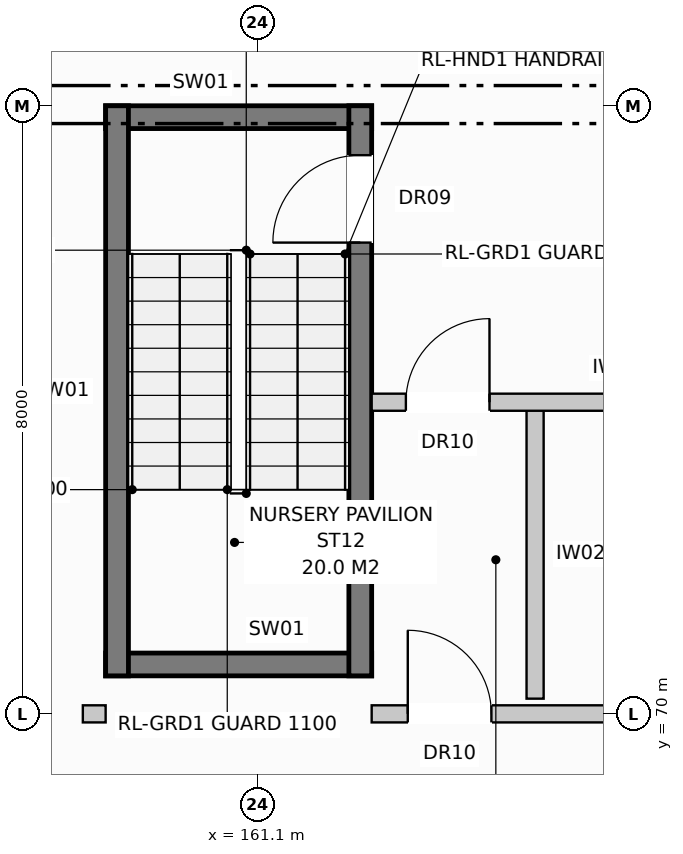
"""IFC4 building model, lengths in metres.
Left out: names, types, materials, properties, quantities, classifications, styles, units other than length and angle.
Written with IfcOpenShell. Run it as: python <this file> out.ifc"""

import sys

from ifc_helpers import new_model, si_unit, direction, frame, frame_2d, origin, origin_with_axes, place, context, subcontext, project, spatial, rectangle, extrude, element, fill, save


model = new_model("IFC4")
c1 = context("Model", 3, precision=1e-05, world=origin(), true_north=direction((0.0, 1.0)))
c2 = subcontext(c1, "Body", "Model", "MODEL_VIEW")
j1 = project(units=[si_unit("LENGTHUNIT", "METRE"), si_unit("PLANEANGLEUNIT", "RADIAN")], contexts=[c1])
p1 = place(None, origin())
s1 = spatial("IfcSite", under=j1, at=p1, CompositionType="ELEMENT")
p2 = place(p1, origin())
s2 = spatial("IfcBuilding", under=s1, at=p2, CompositionType="ELEMENT")
p3 = place(p2, frame((0.0, 0.0, -3.8)))
s3 = spatial("IfcBuildingStorey", under=s2, at=p3, CompositionType="ELEMENT", Elevation=-3.8)
for number, where, z_axis, x_axis in (
    (1, (159.1, 77.85, 0.0), (0.0, 0.0, 1.0), (1.0, 0.0, 0.0)),
    (2, (159.1, 70.65, 0.0), (0.0, 0.0, 1.0), (1.0, 0.0, 0.0)),
):
    element("IfcWall", number, at=place(p3, frame(where, z_axis=z_axis, x_axis=x_axis)), inside=s3, PredefinedType="SHEAR", context=c2, shape_type="SweptSolid", body=[
        extrude(rectangle(XDim=3.5, YDim=0.3, at=frame_2d((1.75, 0.0))), origin(), (0.0, 0.0, 1.0), 3.48),
    ])
p4 = place(p3, frame((159.25, 70.5, 0.0), z_axis=(0.0, 0.0, 1.0), x_axis=(0.0, 1.0, 0.0)))
e3 = element("IfcWall", 3, at=p4, inside=s3, PredefinedType="SHEAR", context=c2, shape_type="SweptSolid", body=[
    extrude(rectangle(XDim=7.5, YDim=0.3, at=frame_2d((3.75, 0.0))), origin(), (0.0, 0.0, 1.0), 3.48),
])
p5 = place(p3, frame((162.45, 70.5, 0.0), z_axis=(0.0, 0.0, 1.0), x_axis=(0.0, 1.0, 0.0)))
e4 = element("IfcWall", 4, at=p5, inside=s3, PredefinedType="SHEAR", context=c2, shape_type="SweptSolid", body=[
    extrude(rectangle(XDim=7.5, YDim=0.3, at=frame_2d((3.75, 0.0))), origin(), (0.0, 0.0, 1.0), 3.48),
])
p6 = place(p5, frame((5.7, 0.0, 0.0)))
e5 = element("IfcOpeningElement", 5, at=p6, cuts=e4, PredefinedType="OPENING", context=c2, shape_type="SweptSolid", body=[
    extrude(rectangle(XDim=1.15, YDim=2.15, at=frame_2d((0.575, 1.075))), frame((0.0, 0.162, 0.0), z_axis=(0.0, -1.0, 0.0), x_axis=(1.0, 0.0, 0.0)), (0.0, 0.0, 1.0), 0.324),
])
p7 = place(p3, frame((164.75, 70.2, 0.0), z_axis=(0.0, 0.0, 1.0), x_axis=(0.0, 1.0, 0.0)))
e6 = element("IfcWall", 6, at=p7, inside=s3, PredefinedType="PARTITIONING", context=c2, shape_type="SweptSolid", body=[
    extrude(rectangle(XDim=3.8, YDim=0.225, at=frame_2d((1.9, 0.0))), origin(), (0.0, 0.0, 1.0), 3.48),
])
p8 = place(p3, frame((162.6, 74.1, 0.0), z_axis=(0.0, 0.0, 1.0), x_axis=(1.0, 0.0, 0.0)))
e7 = element("IfcWall", 7, at=p8, inside=s3, PredefinedType="PARTITIONING", context=c2, shape_type="SweptSolid", body=[
    extrude(rectangle(XDim=4.91, YDim=0.225, at=frame_2d((2.455, 0.0))), origin(), (0.0, 0.0, 1.0), 3.48),
])
p9 = place(p8, frame((0.45, 0.0, 0.0)))
e8 = element("IfcOpeningElement", 8, at=p9, cuts=e7, PredefinedType="OPENING", context=c2, shape_type="SweptSolid", body=[
    extrude(rectangle(XDim=1.1, YDim=2.15, at=frame_2d((0.55, 1.075))), frame((0.0, 0.125, 0.0), z_axis=(0.0, -1.0, 0.0), x_axis=(1.0, 0.0, 0.0)), (0.0, 0.0, 1.0), 0.249),
])
p10 = place(p3, frame((158.8, 70.0, 0.0), z_axis=(0.0, 0.0, 1.0), x_axis=(1.0, 0.0, 0.0)))
e9 = element("IfcWall", 9, at=p10, inside=s3, PredefinedType="PARTITIONING", context=c2, shape_type="SweptSolid", body=[
    extrude(rectangle(XDim=0.3, YDim=0.225, at=frame_2d((0.15, 0.0))), origin(), (0.0, 0.0, 1.0), 3.48),
])
p11 = place(p3, frame((162.6, 70.0, 0.0), z_axis=(0.0, 0.0, 1.0), x_axis=(1.0, 0.0, 0.0)))
e10 = element("IfcWall", 10, at=p11, inside=s3, PredefinedType="PARTITIONING", context=c2, shape_type="SweptSolid", body=[
    extrude(rectangle(XDim=5.4, YDim=0.225, at=frame_2d((2.7, 0.0))), origin(), (0.0, 0.0, 1.0), 2.93),
])
p12 = place(p11, frame((0.475, 0.0, 0.0)))
e11 = element("IfcOpeningElement", 11, at=p12, cuts=e10, PredefinedType="OPENING", context=c2, shape_type="SweptSolid", body=[
    extrude(rectangle(XDim=1.1, YDim=2.15, at=frame_2d((0.55, 1.075))), frame((0.0, 0.125, 0.0), z_axis=(0.0, -1.0, 0.0), x_axis=(1.0, 0.0, 0.0)), (0.0, 0.0, 1.0), 0.249),
])
p13 = place(p6, origin_with_axes())
e12 = element("IfcDoor", 12, at=p13, inside=s3, OperationType="SINGLE_SWING_LEFT", PredefinedType="DOOR", context=c2, shape_type="SweptSolid", body=[
    extrude(rectangle(XDim=1.15, YDim=2.15, at=frame_2d((0.575, 1.075))), frame((0.0, 0.025, 0.0), z_axis=(0.0, -1.0, 0.0), x_axis=(1.0, 0.0, 0.0)), (0.0, 0.0, 1.0), 0.05),
])
fill(e5, e12)
p14 = place(p9, origin_with_axes())
e13 = element("IfcDoor", 13, at=p14, inside=s3, OperationType="SINGLE_SWING_RIGHT", PredefinedType="DOOR", context=c2, shape_type="SweptSolid", body=[
    extrude(rectangle(XDim=1.1, YDim=2.15, at=frame_2d((0.55, 1.075))), frame((0.0, 0.025, 0.0), z_axis=(0.0, -1.0, 0.0), x_axis=(1.0, 0.0, 0.0)), (0.0, 0.0, 1.0), 0.05),
])
fill(e8, e13)
p15 = place(p12, origin_with_axes())
e14 = element("IfcDoor", 14, at=p15, inside=s3, OperationType="SINGLE_SWING_LEFT", PredefinedType="DOOR", context=c2, shape_type="SweptSolid", body=[
    extrude(rectangle(XDim=1.1, YDim=2.15, at=frame_2d((0.55, 1.075))), frame((0.0, 0.025, 0.0), z_axis=(0.0, -1.0, 0.0), x_axis=(1.0, 0.0, 0.0)), (0.0, 0.0, 1.0), 0.05),
])
fill(e11, e14)
save(model, sys.argv[1])
